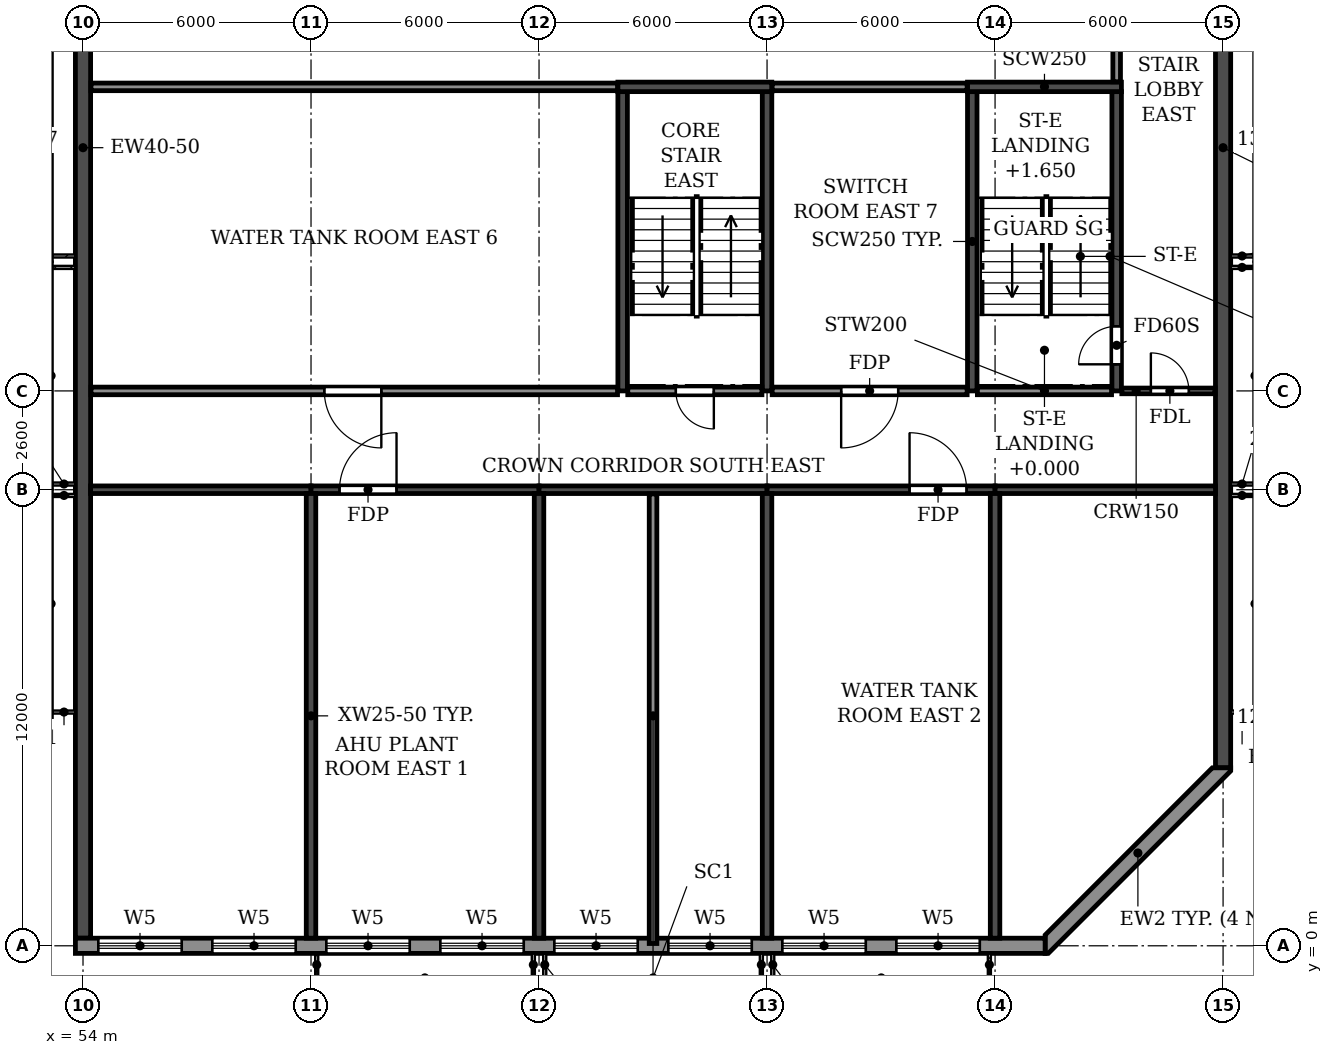
"""IFC4 building model, lengths in metres.
Left out: names, types, materials, properties, quantities, classifications, styles, units other than length and angle.
Written with IfcOpenShell. Run it as: python <this file> out.ifc"""

import sys

from ifc_helpers import new_model, si_unit, direction, frame, frame_2d, origin, place, context, subcontext, project, spatial, polyline, rectangle, outline, extrude, element, fill, save


model = new_model("IFC4")
c1 = context("Model", 3, precision=1e-05, world=origin(), true_north=direction((0.0, 1.0)))
c2 = subcontext(c1, "Body", "Model", "MODEL_VIEW")
j1 = project(units=[si_unit("LENGTHUNIT", "METRE"), si_unit("PLANEANGLEUNIT", "RADIAN")], contexts=[c1])
p1 = place(None, origin())
s1 = spatial("IfcSite", under=j1, at=p1, CompositionType="ELEMENT")
p2 = place(p1, origin())
s2 = spatial("IfcBuilding", under=s1, at=p2, CompositionType="ELEMENT")
p3 = place(p2, frame((0.0, 0.0, 275.7)))
s3 = spatial("IfcBuildingStorey", under=s2, at=p3, CompositionType="ELEMENT", Elevation=275.7)
for number, where, z_axis, x_axis in (
    (1, (60.0, 0.2, 0.0), (0.0, 0.0, 1.0), (0.0, 1.0, 0.0)),
    (2, (66.0, 0.2, 0.0), (0.0, 0.0, 1.0), (0.0, 1.0, 0.0)),
    (3, (72.0, 0.2, 0.0), (0.0, 0.0, 1.0), (0.0, 1.0, 0.0)),
    (4, (78.0, 0.2, 0.0), (0.0, 0.0, 1.0), (0.0, 1.0, 0.0)),
):
    element("IfcWall", number, at=place(p3, frame(where, z_axis=z_axis, x_axis=x_axis)), inside=s3, PredefinedType="SHEAR", context=c2, shape_type="SweptSolid", body=[
        extrude(rectangle(XDim=11.7, YDim=0.25, at=frame_2d((5.85, 0.0))), origin(), (0.0, 0.0, 1.0), 3.05),
    ])
p4 = place(p3, frame((54.0, 0.2, 0.0), z_axis=(0.0, 0.0, 1.0), x_axis=(0.0, 1.0, 0.0)))
e5 = element("IfcWall", 5, at=p4, inside=s3, PredefinedType="SHEAR", context=c2, shape_type="SweptSolid", body=[
    extrude(rectangle(XDim=40.8, YDim=0.4, at=frame_2d((20.4, 0.0))), origin(), (0.0, 0.0, 1.0), 3.05),
])
p5 = place(p3, frame((84.0, 4.683, 0.0), z_axis=(0.0, 0.0, 1.0), x_axis=(0.0, 1.0, 0.0)))
e6 = element("IfcWall", 6, at=p5, inside=s3, PredefinedType="SHEAR", context=c2, shape_type="SweptSolid", body=[
    extrude(rectangle(XDim=31.834, YDim=0.4, at=frame_2d((15.917, 0.0))), origin(), (0.0, 0.0, 1.0), 3.05),
])
p6 = place(p3, frame((54.2, 12.0, 0.0), z_axis=(0.0, 0.0, 1.0), x_axis=(1.0, 0.0, 0.0)))
e7 = element("IfcWall", 7, at=p6, inside=s3, PredefinedType="SHEAR", context=c2, shape_type="SweptSolid", body=[
    extrude(rectangle(XDim=5.8, YDim=0.2, at=frame_2d((2.9, 0.0))), origin(), (0.0, 0.0, 1.0), 2.45),
])
p7 = place(p3, frame((60.0, 12.0, 0.0), z_axis=(0.0, 0.0, 1.0), x_axis=(1.0, 0.0, 0.0)))
e8 = element("IfcWall", 8, at=p7, inside=s3, PredefinedType="SHEAR", context=c2, shape_type="SweptSolid", body=[
    extrude(rectangle(XDim=6.0, YDim=0.2, at=frame_2d((3.0, 0.0))), origin(), (0.0, 0.0, 1.0), 2.45),
])
p8 = place(p7, frame((0.75, 0.0, 0.0)))
e9 = element("IfcOpeningElement", 9, at=p8, cuts=e8, PredefinedType="OPENING", context=c2, shape_type="SweptSolid", body=[
    extrude(rectangle(XDim=1.5, YDim=2.1, at=frame_2d((0.75, 1.05))), frame((0.0, 0.11, 0.0), z_axis=(0.0, -1.0, 0.0), x_axis=(1.0, 0.0, 0.0)), (0.0, 0.0, 1.0), 0.22),
])
p9 = place(p3, frame((66.0, 12.0, 0.0), z_axis=(0.0, 0.0, 1.0), x_axis=(1.0, 0.0, 0.0)))
e10 = element("IfcWall", 10, at=p9, inside=s3, PredefinedType="SHEAR", context=c2, shape_type="SweptSolid", body=[
    extrude(rectangle(XDim=6.0, YDim=0.2, at=frame_2d((3.0, 0.0))), origin(), (0.0, 0.0, 1.0), 2.45),
])
p10 = place(p3, frame((72.0, 12.0, 0.0), z_axis=(0.0, 0.0, 1.0), x_axis=(1.0, 0.0, 0.0)))
e11 = element("IfcWall", 11, at=p10, inside=s3, PredefinedType="SHEAR", context=c2, shape_type="SweptSolid", body=[
    extrude(rectangle(XDim=6.0, YDim=0.2, at=frame_2d((3.0, 0.0))), origin(), (0.0, 0.0, 1.0), 2.45),
])
p11 = place(p10, frame((3.75, 0.0, 0.0)))
e12 = element("IfcOpeningElement", 12, at=p11, cuts=e11, PredefinedType="OPENING", context=c2, shape_type="SweptSolid", body=[
    extrude(rectangle(XDim=1.5, YDim=2.1, at=frame_2d((0.75, 1.05))), frame((0.0, 0.11, 0.0), z_axis=(0.0, -1.0, 0.0), x_axis=(1.0, 0.0, 0.0)), (0.0, 0.0, 1.0), 0.22),
])
p12 = place(p3, frame((78.0, 12.0, 0.0), z_axis=(0.0, 0.0, 1.0), x_axis=(1.0, 0.0, 0.0)))
e13 = element("IfcWall", 13, at=p12, inside=s3, PredefinedType="SHEAR", context=c2, shape_type="SweptSolid", body=[
    extrude(rectangle(XDim=5.8, YDim=0.2, at=frame_2d((2.9, 0.0))), origin(), (0.0, 0.0, 1.0), 2.45),
])
p13 = place(p3, frame((77.4, 14.6, 0.0), z_axis=(0.0, 0.0, 1.0), x_axis=(0.0, 1.0, 0.0)))
e14 = element("IfcWall", 14, at=p13, inside=s3, PredefinedType="SOLIDWALL", context=c2, shape_type="SweptSolid", body=[
    extrude(rectangle(XDim=7.875, YDim=0.25, at=frame_2d((3.938, 0.0))), origin(), (0.0, 0.0, 1.0), 3.05),
])
p14 = place(p3, frame((81.2, 14.6, 0.0), z_axis=(0.0, 0.0, 1.0), x_axis=(0.0, 1.0, 0.0)))
e15 = element("IfcWall", 15, at=p14, inside=s3, PredefinedType="SOLIDWALL", context=c2, shape_type="SweptSolid", body=[
    extrude(rectangle(XDim=7.875, YDim=0.25, at=frame_2d((3.938, 0.0))), origin(), (0.0, 0.0, 1.0), 3.05),
])
p15 = place(p14, frame((0.7, 0.0, 0.0)))
e16 = element("IfcOpeningElement", 16, at=p15, cuts=e15, PredefinedType="OPENING", context=c2, shape_type="SweptSolid", body=[
    extrude(rectangle(XDim=1.0, YDim=2.1, at=frame_2d((0.5, 1.05))), frame((0.0, 0.135, 0.0), z_axis=(0.0, -1.0, 0.0), x_axis=(1.0, 0.0, 0.0)), (0.0, 0.0, 1.0), 0.27),
])
p16 = place(p3, frame((77.275, 22.6, 0.0), z_axis=(0.0, 0.0, 1.0), x_axis=(1.0, 0.0, 0.0)))
e17 = element("IfcWall", 17, at=p16, inside=s3, PredefinedType="SOLIDWALL", context=c2, shape_type="SweptSolid", body=[
    extrude(rectangle(XDim=4.05, YDim=0.25, at=frame_2d((2.025, 0.0))), origin(), (0.0, 0.0, 1.0), 3.05),
])
for number, where, z_axis, x_axis in (
    (18, (68.2, 14.6, 0.0), (0.0, 0.0, 1.0), (0.0, 1.0, 0.0)),
    (19, (72.0, 14.6, 0.0), (0.0, 0.0, 1.0), (0.0, 1.0, 0.0)),
):
    element("IfcWall", number, at=place(p3, frame(where, z_axis=z_axis, x_axis=x_axis)), inside=s3, PredefinedType="SOLIDWALL", context=c2, shape_type="SweptSolid", body=[
        extrude(rectangle(XDim=7.875, YDim=0.25, at=frame_2d((3.938, 0.0))), origin(), (0.0, 0.0, 1.0), 3.05),
    ])
p17 = place(p3, frame((68.075, 22.6, 0.0), z_axis=(0.0, 0.0, 1.0), x_axis=(1.0, 0.0, 0.0)))
e20 = element("IfcWall", 20, at=p17, inside=s3, PredefinedType="SOLIDWALL", context=c2, shape_type="SweptSolid", body=[
    extrude(rectangle(XDim=4.05, YDim=0.25, at=frame_2d((2.025, 0.0))), origin(), (0.0, 0.0, 1.0), 3.05),
])
p18 = place(p3, frame((53.8, 0.0, 0.0), z_axis=(0.0, 0.0, 1.0), x_axis=(1.0, 0.0, 0.0)))
e21 = element("IfcWall", 21, at=p18, inside=s3, PredefinedType="STANDARD", context=c2, shape_type="SweptSolid", body=[
    extrude(rectangle(XDim=25.517, YDim=0.4, at=frame_2d((12.759, 0.0))), origin(), (0.0, 0.0, 1.0), 3.05),
])
p19 = place(p18, frame((0.6, 0.0, 0.6)))
e22 = element("IfcOpeningElement", 22, at=p19, cuts=e21, PredefinedType="OPENING", context=c2, shape_type="SweptSolid", body=[
    extrude(rectangle(XDim=2.2, YDim=2.4, at=frame_2d((1.1, 1.2))), frame((0.0, 0.21, 0.0), z_axis=(0.0, -1.0, 0.0), x_axis=(1.0, 0.0, 0.0)), (0.0, 0.0, 1.0), 0.42),
])
p20 = place(p18, frame((3.6, 0.0, 0.6)))
e23 = element("IfcOpeningElement", 23, at=p20, cuts=e21, PredefinedType="OPENING", context=c2, shape_type="SweptSolid", body=[
    extrude(rectangle(XDim=2.2, YDim=2.4, at=frame_2d((1.1, 1.2))), frame((0.0, 0.21, 0.0), z_axis=(0.0, -1.0, 0.0), x_axis=(1.0, 0.0, 0.0)), (0.0, 0.0, 1.0), 0.42),
])
p21 = place(p18, frame((6.6, 0.0, 0.6)))
e24 = element("IfcOpeningElement", 24, at=p21, cuts=e21, PredefinedType="OPENING", context=c2, shape_type="SweptSolid", body=[
    extrude(rectangle(XDim=2.2, YDim=2.4, at=frame_2d((1.1, 1.2))), frame((0.0, 0.21, 0.0), z_axis=(0.0, -1.0, 0.0), x_axis=(1.0, 0.0, 0.0)), (0.0, 0.0, 1.0), 0.42),
])
p22 = place(p18, frame((9.6, 0.0, 0.6)))
e25 = element("IfcOpeningElement", 25, at=p22, cuts=e21, PredefinedType="OPENING", context=c2, shape_type="SweptSolid", body=[
    extrude(rectangle(XDim=2.2, YDim=2.4, at=frame_2d((1.1, 1.2))), frame((0.0, 0.21, 0.0), z_axis=(0.0, -1.0, 0.0), x_axis=(1.0, 0.0, 0.0)), (0.0, 0.0, 1.0), 0.42),
])
p23 = place(p18, frame((12.6, 0.0, 0.6)))
e26 = element("IfcOpeningElement", 26, at=p23, cuts=e21, PredefinedType="OPENING", context=c2, shape_type="SweptSolid", body=[
    extrude(rectangle(XDim=2.2, YDim=2.4, at=frame_2d((1.1, 1.2))), frame((0.0, 0.21, 0.0), z_axis=(0.0, -1.0, 0.0), x_axis=(1.0, 0.0, 0.0)), (0.0, 0.0, 1.0), 0.42),
])
p24 = place(p18, frame((15.6, 0.0, 0.6)))
e27 = element("IfcOpeningElement", 27, at=p24, cuts=e21, PredefinedType="OPENING", context=c2, shape_type="SweptSolid", body=[
    extrude(rectangle(XDim=2.2, YDim=2.4, at=frame_2d((1.1, 1.2))), frame((0.0, 0.21, 0.0), z_axis=(0.0, -1.0, 0.0), x_axis=(1.0, 0.0, 0.0)), (0.0, 0.0, 1.0), 0.42),
])
p25 = place(p18, frame((18.6, 0.0, 0.6)))
e28 = element("IfcOpeningElement", 28, at=p25, cuts=e21, PredefinedType="OPENING", context=c2, shape_type="SweptSolid", body=[
    extrude(rectangle(XDim=2.2, YDim=2.4, at=frame_2d((1.1, 1.2))), frame((0.0, 0.21, 0.0), z_axis=(0.0, -1.0, 0.0), x_axis=(1.0, 0.0, 0.0)), (0.0, 0.0, 1.0), 0.42),
])
p26 = place(p18, frame((21.6, 0.0, 0.6)))
e29 = element("IfcOpeningElement", 29, at=p26, cuts=e21, PredefinedType="OPENING", context=c2, shape_type="SweptSolid", body=[
    extrude(rectangle(XDim=2.2, YDim=2.4, at=frame_2d((1.1, 1.2))), frame((0.0, 0.21, 0.0), z_axis=(0.0, -1.0, 0.0), x_axis=(1.0, 0.0, 0.0)), (0.0, 0.0, 1.0), 0.42),
])
p27 = place(p3, origin())
e30 = element("IfcWall", 30, at=p27, inside=s3, PredefinedType="STANDARD", context=c2, shape_type="SweptSolid", body=[
    extrude(outline(polyline([(79.317, -0.2), (79.4, -0.2), (84.2, 4.6), (84.2, 4.683), (83.717, 4.683), (79.317, 0.283), (79.317, -0.2)])), origin(), (0.0, 0.0, 1.0), 3.05),
])
p28 = place(p3, frame((81.335, 14.6, 0.0), z_axis=(0.0, 0.0, 1.0), x_axis=(1.0, 0.0, 0.0)))
e31 = element("IfcWall", 31, at=p28, inside=s3, PredefinedType="PARTITIONING", context=c2, shape_type="SweptSolid", body=[
    extrude(rectangle(XDim=2.455, YDim=0.15, at=frame_2d((1.228, 0.0))), origin(), (0.0, 0.0, 1.0), 3.05),
])
p29 = place(p28, frame((0.765, 0.0, 0.0)))
e32 = element("IfcOpeningElement", 32, at=p29, cuts=e31, PredefinedType="OPENING", context=c2, shape_type="SweptSolid", body=[
    extrude(rectangle(XDim=1.0, YDim=2.1, at=frame_2d((0.5, 1.05))), frame((0.0, 0.085, 0.0), z_axis=(0.0, -1.0, 0.0), x_axis=(1.0, 0.0, 0.0)), (0.0, 0.0, 1.0), 0.17),
])
p30 = place(p3, frame((54.21, 14.6, 0.0), z_axis=(0.0, 0.0, 1.0), x_axis=(1.0, 0.0, 0.0)))
e33 = element("IfcWall", 33, at=p30, inside=s3, PredefinedType="PARTITIONING", context=c2, shape_type="SweptSolid", body=[
    extrude(rectangle(XDim=13.855, YDim=0.2, at=frame_2d((6.927, 0.0))), origin(), (0.0, 0.0, 1.0), 3.05),
])
p31 = place(p30, frame((6.14, 0.0, 0.0)))
e34 = element("IfcOpeningElement", 34, at=p31, cuts=e33, PredefinedType="OPENING", context=c2, shape_type="SweptSolid", body=[
    extrude(rectangle(XDim=1.5, YDim=2.1, at=frame_2d((0.75, 1.05))), frame((0.0, 0.11, 0.0), z_axis=(0.0, -1.0, 0.0), x_axis=(1.0, 0.0, 0.0)), (0.0, 0.0, 1.0), 0.22),
])
p32 = place(p3, frame((72.135, 14.6, 0.0), z_axis=(0.0, 0.0, 1.0), x_axis=(1.0, 0.0, 0.0)))
e35 = element("IfcWall", 35, at=p32, inside=s3, PredefinedType="PARTITIONING", context=c2, shape_type="SweptSolid", body=[
    extrude(rectangle(XDim=5.13, YDim=0.2, at=frame_2d((2.565, 0.0))), origin(), (0.0, 0.0, 1.0), 3.05),
])
p33 = place(p32, frame((1.815, 0.0, 0.0)))
e36 = element("IfcOpeningElement", 36, at=p33, cuts=e35, PredefinedType="OPENING", context=c2, shape_type="SweptSolid", body=[
    extrude(rectangle(XDim=1.5, YDim=2.1, at=frame_2d((0.75, 1.05))), frame((0.0, 0.11, 0.0), z_axis=(0.0, -1.0, 0.0), x_axis=(1.0, 0.0, 0.0)), (0.0, 0.0, 1.0), 0.22),
])
p34 = place(p3, frame((54.21, 22.6, 0.0), z_axis=(0.0, 0.0, 1.0), x_axis=(1.0, 0.0, 0.0)))
e37 = element("IfcWall", 37, at=p34, inside=s3, PredefinedType="PARTITIONING", context=c2, shape_type="SweptSolid", body=[
    extrude(rectangle(XDim=13.855, YDim=0.2, at=frame_2d((6.927, 0.0))), origin(), (0.0, 0.0, 1.0), 3.05),
])
p35 = place(p3, frame((72.135, 22.6, 0.0), z_axis=(0.0, 0.0, 1.0), x_axis=(1.0, 0.0, 0.0)))
e38 = element("IfcWall", 38, at=p35, inside=s3, PredefinedType="PARTITIONING", context=c2, shape_type="SweptSolid", body=[
    extrude(rectangle(XDim=5.13, YDim=0.2, at=frame_2d((2.565, 0.0))), origin(), (0.0, 0.0, 1.0), 3.05),
])
p36 = place(p3, frame((69.0, 0.06, 0.0), z_axis=(0.0, 0.0, 1.0), x_axis=(0.0, 1.0, 0.0)))
e39 = element("IfcWall", 39, at=p36, inside=s3, PredefinedType="PARTITIONING", context=c2, shape_type="SweptSolid", body=[
    extrude(rectangle(XDim=11.83, YDim=0.2, at=frame_2d((5.915, 0.0))), origin(), (0.0, 0.0, 1.0), 3.05),
])
p37 = place(p3, frame((81.2, 22.735, 0.0), z_axis=(0.0, 0.0, 1.0), x_axis=(0.0, 1.0, 0.0)))
e40 = element("IfcWall", 40, at=p37, inside=s3, PredefinedType="PARTITIONING", context=c2, shape_type="SweptSolid", body=[
    extrude(rectangle(XDim=4.965, YDim=0.2, at=frame_2d((2.482, 0.0))), origin(), (0.0, 0.0, 1.0), 3.05),
])
p38 = place(p3, frame((68.335, 14.6, 0.0), z_axis=(0.0, 0.0, 1.0), x_axis=(1.0, 0.0, 0.0)))
e41 = element("IfcWall", 41, at=p38, inside=s3, PredefinedType="PARTITIONING", context=c2, shape_type="SweptSolid", body=[
    extrude(rectangle(XDim=3.53, YDim=0.2, at=frame_2d((1.765, 0.0))), origin(), (0.0, 0.0, 1.0), 3.05),
])
p39 = place(p38, frame((1.265, 0.0, 0.0)))
e42 = element("IfcOpeningElement", 42, at=p39, cuts=e41, PredefinedType="OPENING", context=c2, shape_type="SweptSolid", body=[
    extrude(rectangle(XDim=1.0, YDim=2.1, at=frame_2d((0.5, 1.05))), frame((0.0, 0.11, 0.0), z_axis=(0.0, -1.0, 0.0), x_axis=(1.0, 0.0, 0.0)), (0.0, 0.0, 1.0), 0.22),
])
p40 = place(p3, frame((77.535, 14.6, 0.0), z_axis=(0.0, 0.0, 1.0), x_axis=(1.0, 0.0, 0.0)))
e43 = element("IfcWall", 43, at=p40, inside=s3, PredefinedType="PARTITIONING", context=c2, shape_type="SweptSolid", body=[
    extrude(rectangle(XDim=3.53, YDim=0.2, at=frame_2d((1.765, 0.0))), origin(), (0.0, 0.0, 1.0), 3.05),
])
p41 = place(p19, origin())
e44 = element("IfcWindow", 44, at=p41, inside=s3, PartitioningType="TRIPLE_PANEL_HORIZONTAL", PredefinedType="WINDOW", context=c2, shape_type="SweptSolid", body=[
    extrude(rectangle(XDim=2.2, YDim=2.4, at=frame_2d((1.1, 1.2))), frame((0.0, 0.03, 0.0), z_axis=(0.0, -1.0, 0.0), x_axis=(1.0, 0.0, 0.0)), (0.0, 0.0, 1.0), 0.06),
])
fill(e22, e44)
p42 = place(p20, origin())
e45 = element("IfcWindow", 45, at=p42, inside=s3, PartitioningType="TRIPLE_PANEL_HORIZONTAL", PredefinedType="WINDOW", context=c2, shape_type="SweptSolid", body=[
    extrude(rectangle(XDim=2.2, YDim=2.4, at=frame_2d((1.1, 1.2))), frame((0.0, 0.03, 0.0), z_axis=(0.0, -1.0, 0.0), x_axis=(1.0, 0.0, 0.0)), (0.0, 0.0, 1.0), 0.06),
])
fill(e23, e45)
p43 = place(p21, origin())
e46 = element("IfcWindow", 46, at=p43, inside=s3, PartitioningType="TRIPLE_PANEL_HORIZONTAL", PredefinedType="WINDOW", context=c2, shape_type="SweptSolid", body=[
    extrude(rectangle(XDim=2.2, YDim=2.4, at=frame_2d((1.1, 1.2))), frame((0.0, 0.03, 0.0), z_axis=(0.0, -1.0, 0.0), x_axis=(1.0, 0.0, 0.0)), (0.0, 0.0, 1.0), 0.06),
])
fill(e24, e46)
p44 = place(p22, origin())
e47 = element("IfcWindow", 47, at=p44, inside=s3, PartitioningType="TRIPLE_PANEL_HORIZONTAL", PredefinedType="WINDOW", context=c2, shape_type="SweptSolid", body=[
    extrude(rectangle(XDim=2.2, YDim=2.4, at=frame_2d((1.1, 1.2))), frame((0.0, 0.03, 0.0), z_axis=(0.0, -1.0, 0.0), x_axis=(1.0, 0.0, 0.0)), (0.0, 0.0, 1.0), 0.06),
])
fill(e25, e47)
p45 = place(p23, origin())
e48 = element("IfcWindow", 48, at=p45, inside=s3, PartitioningType="TRIPLE_PANEL_HORIZONTAL", PredefinedType="WINDOW", context=c2, shape_type="SweptSolid", body=[
    extrude(rectangle(XDim=2.2, YDim=2.4, at=frame_2d((1.1, 1.2))), frame((0.0, 0.03, 0.0), z_axis=(0.0, -1.0, 0.0), x_axis=(1.0, 0.0, 0.0)), (0.0, 0.0, 1.0), 0.06),
])
fill(e26, e48)
p46 = place(p24, origin())
e49 = element("IfcWindow", 49, at=p46, inside=s3, PartitioningType="TRIPLE_PANEL_HORIZONTAL", PredefinedType="WINDOW", context=c2, shape_type="SweptSolid", body=[
    extrude(rectangle(XDim=2.2, YDim=2.4, at=frame_2d((1.1, 1.2))), frame((0.0, 0.03, 0.0), z_axis=(0.0, -1.0, 0.0), x_axis=(1.0, 0.0, 0.0)), (0.0, 0.0, 1.0), 0.06),
])
fill(e27, e49)
p47 = place(p25, origin())
e50 = element("IfcWindow", 50, at=p47, inside=s3, PartitioningType="TRIPLE_PANEL_HORIZONTAL", PredefinedType="WINDOW", context=c2, shape_type="SweptSolid", body=[
    extrude(rectangle(XDim=2.2, YDim=2.4, at=frame_2d((1.1, 1.2))), frame((0.0, 0.03, 0.0), z_axis=(0.0, -1.0, 0.0), x_axis=(1.0, 0.0, 0.0)), (0.0, 0.0, 1.0), 0.06),
])
fill(e28, e50)
p48 = place(p26, origin())
e51 = element("IfcWindow", 51, at=p48, inside=s3, PartitioningType="TRIPLE_PANEL_HORIZONTAL", PredefinedType="WINDOW", context=c2, shape_type="SweptSolid", body=[
    extrude(rectangle(XDim=2.2, YDim=2.4, at=frame_2d((1.1, 1.2))), frame((0.0, 0.03, 0.0), z_axis=(0.0, -1.0, 0.0), x_axis=(1.0, 0.0, 0.0)), (0.0, 0.0, 1.0), 0.06),
])
fill(e29, e51)
p49 = place(p31, frame((1.5, 0.0, 0.0), z_axis=(0.0, 0.0, 1.0), x_axis=(-1.0, 0.0, 0.0)))
e52 = element("IfcDoor", 52, at=p49, inside=s3, OperationType="DOUBLE_DOOR_SINGLE_SWING", PredefinedType="DOOR", context=c2, shape_type="SweptSolid", body=[
    extrude(rectangle(XDim=1.5, YDim=2.1, at=frame_2d((0.75, 1.05))), frame((0.0, 0.025, 0.0), z_axis=(0.0, -1.0, 0.0), x_axis=(1.0, 0.0, 0.0)), (0.0, 0.0, 1.0), 0.05),
])
fill(e34, e52)
p50 = place(p8, origin())
e53 = element("IfcDoor", 53, at=p50, inside=s3, OperationType="DOUBLE_DOOR_SINGLE_SWING", PredefinedType="DOOR", context=c2, shape_type="SweptSolid", body=[
    extrude(rectangle(XDim=1.5, YDim=2.1, at=frame_2d((0.75, 1.05))), frame((0.0, 0.025, 0.0), z_axis=(0.0, -1.0, 0.0), x_axis=(1.0, 0.0, 0.0)), (0.0, 0.0, 1.0), 0.05),
])
fill(e9, e53)
p51 = place(p33, frame((1.5, 0.0, 0.0), z_axis=(0.0, 0.0, 1.0), x_axis=(-1.0, 0.0, 0.0)))
e54 = element("IfcDoor", 54, at=p51, inside=s3, OperationType="DOUBLE_DOOR_SINGLE_SWING", PredefinedType="DOOR", context=c2, shape_type="SweptSolid", body=[
    extrude(rectangle(XDim=1.5, YDim=2.1, at=frame_2d((0.75, 1.05))), frame((0.0, 0.025, 0.0), z_axis=(0.0, -1.0, 0.0), x_axis=(1.0, 0.0, 0.0)), (0.0, 0.0, 1.0), 0.05),
])
fill(e36, e54)
p52 = place(p11, origin())
e55 = element("IfcDoor", 55, at=p52, inside=s3, OperationType="DOUBLE_DOOR_SINGLE_SWING", PredefinedType="DOOR", context=c2, shape_type="SweptSolid", body=[
    extrude(rectangle(XDim=1.5, YDim=2.1, at=frame_2d((0.75, 1.05))), frame((0.0, 0.025, 0.0), z_axis=(0.0, -1.0, 0.0), x_axis=(1.0, 0.0, 0.0)), (0.0, 0.0, 1.0), 0.05),
])
fill(e12, e55)
p53 = place(p15, origin())
e56 = element("IfcDoor", 56, at=p53, inside=s3, OperationType="SINGLE_SWING_LEFT", PredefinedType="DOOR", context=c2, shape_type="SweptSolid", body=[
    extrude(rectangle(XDim=1.0, YDim=2.1, at=frame_2d((0.5, 1.05))), frame((0.0, 0.025, 0.0), z_axis=(0.0, -1.0, 0.0), x_axis=(1.0, 0.0, 0.0)), (0.0, 0.0, 1.0), 0.05),
])
fill(e16, e56)
p54 = place(p29, origin())
e57 = element("IfcDoor", 57, at=p54, inside=s3, OperationType="SINGLE_SWING_LEFT", PredefinedType="DOOR", context=c2, shape_type="SweptSolid", body=[
    extrude(rectangle(XDim=1.0, YDim=2.1, at=frame_2d((0.5, 1.05))), frame((0.0, 0.025, 0.0), z_axis=(0.0, -1.0, 0.0), x_axis=(1.0, 0.0, 0.0)), (0.0, 0.0, 1.0), 0.05),
])
fill(e32, e57)
p55 = place(p39, frame((1.0, 0.0, 0.0), z_axis=(0.0, 0.0, 1.0), x_axis=(-1.0, 0.0, 0.0)))
e58 = element("IfcDoor", 58, at=p55, inside=s3, OperationType="SINGLE_SWING_LEFT", PredefinedType="DOOR", context=c2, shape_type="SweptSolid", body=[
    extrude(rectangle(XDim=1.0, YDim=2.1, at=frame_2d((0.5, 1.05))), frame((0.0, 0.025, 0.0), z_axis=(0.0, -1.0, 0.0), x_axis=(1.0, 0.0, 0.0)), (0.0, 0.0, 1.0), 0.05),
])
fill(e42, e58)
save(model, sys.argv[1])
